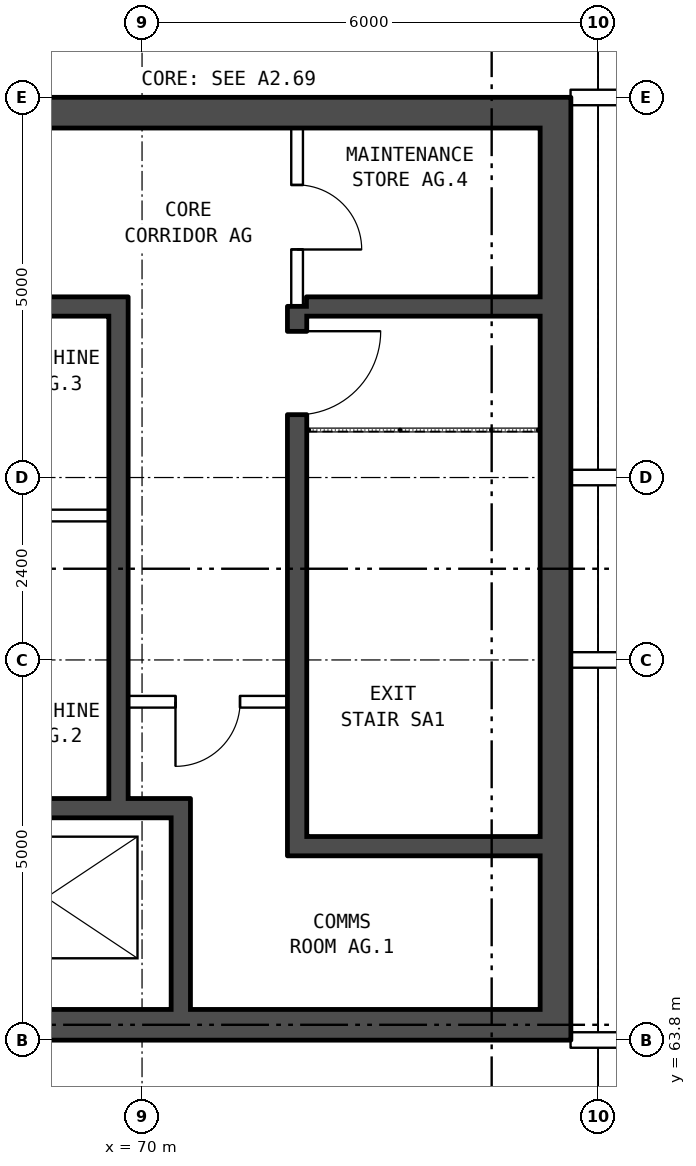
"""IFC4 building model, lengths in metres.
Left out: names, types, materials, properties, quantities, classifications, styles, units other than length and angle.
Written with IfcOpenShell. Run it as: python <this file> out.ifc"""

import sys

from ifc_helpers import new_model, si_unit, direction, frame, frame_2d, origin, place, context, subcontext, project, spatial, rectangle, extrude, element, fill, save


model = new_model("IFC4")
c1 = context("Model", 3, precision=1e-05, world=origin(), true_north=direction((0.0, 1.0)))
c2 = subcontext(c1, "Body", "Model", "MODEL_VIEW")
j1 = project(units=[si_unit("LENGTHUNIT", "METRE"), si_unit("PLANEANGLEUNIT", "RADIAN")], contexts=[c1])
p1 = place(None, origin())
s1 = spatial("IfcSite", under=j1, at=p1, CompositionType="ELEMENT")
p2 = place(p1, origin())
s2 = spatial("IfcBuilding", under=s1, at=p2, CompositionType="ELEMENT")
p3 = place(p2, frame((0.0, 0.0, 243.9)))
s3 = spatial("IfcBuildingStorey", under=s2, at=p3, CompositionType="ELEMENT", Elevation=243.9)
p4 = place(p3, frame((75.44, 63.8, 0.0), z_axis=(0.0, 0.0, 1.0), x_axis=(0.0, 1.0, 0.0)))
e1 = element("IfcWall", 1, at=p4, inside=s3, PredefinedType="SHEAR", context=c2, shape_type="SweptSolid", body=[
    extrude(rectangle(XDim=12.4, YDim=0.4, at=frame_2d((6.2, 0.0))), origin(), (0.0, 0.0, 1.0), 3.3),
])
for number, where, z_axis, x_axis in (
    (2, (67.04, 64.0, 0.0), (0.0, 0.0, 1.0), (1.0, 0.0, 0.0)),
    (3, (67.04, 76.0, 0.0), (0.0, 0.0, 1.0), (1.0, 0.0, 0.0)),
):
    element("IfcWall", number, at=place(p3, frame(where, z_axis=z_axis, x_axis=x_axis)), inside=s3, PredefinedType="SHEAR", context=c2, shape_type="SweptSolid", body=[
        extrude(rectangle(XDim=8.2, YDim=0.4, at=frame_2d((4.1, 0.0))), origin(), (0.0, 0.0, 1.0), 3.3),
    ])
p5 = place(p3, frame((72.165, 66.35, 0.0), z_axis=(0.0, 0.0, 1.0), x_axis=(1.0, 0.0, 0.0)))
e4 = element("IfcWall", 4, at=p5, inside=s3, PredefinedType="SHEAR", context=c2, shape_type="SweptSolid", body=[
    extrude(rectangle(XDim=3.075, YDim=0.25, at=frame_2d((1.538, 0.0))), origin(), (0.0, 0.0, 1.0), 3.3),
])
p6 = place(p3, frame((67.04, 66.85, 0.0), z_axis=(0.0, 0.0, 1.0), x_axis=(1.0, 0.0, 0.0)))
e5 = element("IfcWall", 5, at=p6, inside=s3, PredefinedType="SHEAR", context=c2, shape_type="SweptSolid", body=[
    extrude(rectangle(XDim=3.595, YDim=0.25, at=frame_2d((1.797, 0.0))), origin(), (0.0, 0.0, 1.0), 3.3),
])
p7 = place(p3, frame((69.815, 68.25, 0.0), z_axis=(0.0, 0.0, 1.0), x_axis=(1.0, 0.0, 0.0)))
e6 = element("IfcWall", 6, at=p7, inside=s3, PredefinedType="PARTITIONING", context=c2, shape_type="SweptSolid", body=[
    extrude(rectangle(XDim=2.1, YDim=0.15, at=frame_2d((1.05, 0.0))), origin(), (0.0, 0.0, 1.0), 3.3),
])
p8 = place(p7, frame((0.625, 0.0, 0.0)))
e7 = element("IfcOpeningElement", 7, at=p8, cuts=e6, PredefinedType="OPENING", context=c2, shape_type="SweptSolid", body=[
    extrude(rectangle(XDim=0.85, YDim=2.1, at=frame_2d((0.425, 1.05))), frame((0.0, 0.085, 0.0), z_axis=(0.0, -1.0, 0.0), x_axis=(1.0, 0.0, 0.0)), (0.0, 0.0, 1.0), 0.17),
])
p9 = place(p3, frame((67.04, 70.7, 0.0), z_axis=(0.0, 0.0, 1.0), x_axis=(1.0, 0.0, 0.0)))
e8 = element("IfcWall", 8, at=p9, inside=s3, PredefinedType="PARTITIONING", context=c2, shape_type="SweptSolid", body=[
    extrude(rectangle(XDim=2.525, YDim=0.15, at=frame_2d((1.262, 0.0))), origin(), (0.0, 0.0, 1.0), 3.3),
])
p10 = place(p3, frame((67.04, 73.45, 0.0), z_axis=(0.0, 0.0, 1.0), x_axis=(1.0, 0.0, 0.0)))
e9 = element("IfcWall", 9, at=p10, inside=s3, PredefinedType="SHEAR", context=c2, shape_type="SweptSolid", body=[
    extrude(rectangle(XDim=2.525, YDim=0.25, at=frame_2d((1.262, 0.0))), origin(), (0.0, 0.0, 1.0), 3.3),
])
p11 = place(p3, frame((72.165, 73.45, 0.0), z_axis=(0.0, 0.0, 1.0), x_axis=(1.0, 0.0, 0.0)))
e10 = element("IfcWall", 10, at=p11, inside=s3, PredefinedType="SHEAR", context=c2, shape_type="SweptSolid", body=[
    extrude(rectangle(XDim=3.075, YDim=0.25, at=frame_2d((1.538, 0.0))), origin(), (0.0, 0.0, 1.0), 3.3),
])
p12 = place(p3, frame((69.69, 66.975, 0.0), z_axis=(0.0, 0.0, 1.0), x_axis=(0.0, 1.0, 0.0)))
e11 = element("IfcWall", 11, at=p12, inside=s3, PredefinedType="SHEAR", context=c2, shape_type="SweptSolid", body=[
    extrude(rectangle(XDim=6.6, YDim=0.25, at=frame_2d((3.3, 0.0))), origin(), (0.0, 0.0, 1.0), 3.3),
])
p13 = place(p3, frame((70.51, 64.2, 0.0), z_axis=(0.0, 0.0, 1.0), x_axis=(0.0, 1.0, 0.0)))
e12 = element("IfcWall", 12, at=p13, inside=s3, PredefinedType="SHEAR", context=c2, shape_type="SweptSolid", body=[
    extrude(rectangle(XDim=2.525, YDim=0.25, at=frame_2d((1.263, 0.0))), origin(), (0.0, 0.0, 1.0), 3.3),
])
p14 = place(p3, frame((72.04, 66.225, 0.0), z_axis=(0.0, 0.0, 1.0), x_axis=(0.0, 1.0, 0.0)))
e13 = element("IfcWall", 13, at=p14, inside=s3, PredefinedType="SHEAR", context=c2, shape_type="SweptSolid", body=[
    extrude(rectangle(XDim=7.225, YDim=0.25, at=frame_2d((3.612, 0.0))), origin(), (0.0, 0.0, 1.0), 3.3),
])
p15 = place(p14, frame((5.8, 0.0, 0.0)))
e14 = element("IfcOpeningElement", 14, at=p15, cuts=e13, PredefinedType="OPENING", context=c2, shape_type="SweptSolid", body=[
    extrude(rectangle(XDim=1.1, YDim=2.1, at=frame_2d((0.55, 1.05))), frame((0.0, 0.135, 0.0), z_axis=(0.0, -1.0, 0.0), x_axis=(1.0, 0.0, 0.0)), (0.0, 0.0, 1.0), 0.27),
])
p16 = place(p3, frame((72.04, 73.45, 0.0), z_axis=(0.0, 0.0, 1.0), x_axis=(0.0, 1.0, 0.0)))
e15 = element("IfcWall", 15, at=p16, inside=s3, PredefinedType="PARTITIONING", context=c2, shape_type="SweptSolid", body=[
    extrude(rectangle(XDim=2.35, YDim=0.15, at=frame_2d((1.175, 0.0))), origin(), (0.0, 0.0, 1.0), 3.3),
])
p17 = place(p16, frame((0.75, 0.0, 0.0)))
e16 = element("IfcOpeningElement", 16, at=p17, cuts=e15, PredefinedType="OPENING", context=c2, shape_type="SweptSolid", body=[
    extrude(rectangle(XDim=0.85, YDim=2.1, at=frame_2d((0.425, 1.05))), frame((0.0, 0.085, 0.0), z_axis=(0.0, -1.0, 0.0), x_axis=(1.0, 0.0, 0.0)), (0.0, 0.0, 1.0), 0.17),
])
p18 = place(p3, frame((75.64, 63.8, 0.0), z_axis=(0.0, 0.0, 1.0), x_axis=(1.0, 0.0, 0.0)))
e17 = element("IfcWall", 17, at=p18, inside=s3, PredefinedType="PARTITIONING", context=c2, shape_type="SweptSolid", body=[
    extrude(rectangle(XDim=26.66, YDim=0.2, at=frame_2d((13.33, 0.0))), origin(), (0.0, 0.0, 1.0), 3.3),
])
p19 = place(p18, frame((12.58, 0.0, 0.0)))
e18 = element("IfcOpeningElement", 18, at=p19, cuts=e17, PredefinedType="OPENING", context=c2, shape_type="SweptSolid", body=[
    extrude(rectangle(XDim=1.0, YDim=2.1, at=frame_2d((0.5, 1.05))), frame((0.0, 0.11, 0.0), z_axis=(0.0, -1.0, 0.0), x_axis=(1.0, 0.0, 0.0)), (0.0, 0.0, 1.0), 0.22),
])
p20 = place(p3, frame((75.64, 68.8, 0.0), z_axis=(0.0, 0.0, 1.0), x_axis=(1.0, 0.0, 0.0)))
e19 = element("IfcWall", 19, at=p20, inside=s3, PredefinedType="PARTITIONING", context=c2, shape_type="SweptSolid", body=[
    extrude(rectangle(XDim=26.66, YDim=0.2, at=frame_2d((13.33, 0.0))), origin(), (0.0, 0.0, 1.0), 3.3),
])
p21 = place(p3, frame((75.64, 71.2, 0.0), z_axis=(0.0, 0.0, 1.0), x_axis=(1.0, 0.0, 0.0)))
e20 = element("IfcWall", 20, at=p21, inside=s3, PredefinedType="PARTITIONING", context=c2, shape_type="SweptSolid", body=[
    extrude(rectangle(XDim=55.72, YDim=0.2, at=frame_2d((27.86, 0.0))), origin(), (0.0, 0.0, 1.0), 3.3),
])
p22 = place(p21, frame((6.555, 0.0, 0.0)))
e21 = element("IfcOpeningElement", 21, at=p22, cuts=e20, PredefinedType="OPENING", context=c2, shape_type="SweptSolid", body=[
    extrude(rectangle(XDim=1.0, YDim=2.1, at=frame_2d((0.5, 1.05))), frame((0.0, 0.11, 0.0), z_axis=(0.0, -1.0, 0.0), x_axis=(1.0, 0.0, 0.0)), (0.0, 0.0, 1.0), 0.22),
])
p23 = place(p21, frame((27.36, 0.0, 0.0)))
e22 = element("IfcOpeningElement", 22, at=p23, cuts=e20, PredefinedType="OPENING", context=c2, shape_type="SweptSolid", body=[
    extrude(rectangle(XDim=1.0, YDim=2.1, at=frame_2d((0.5, 1.05))), frame((0.0, 0.11, 0.0), z_axis=(0.0, -1.0, 0.0), x_axis=(1.0, 0.0, 0.0)), (0.0, 0.0, 1.0), 0.22),
])
p24 = place(p21, frame((48.165, 0.0, 0.0)))
e23 = element("IfcOpeningElement", 23, at=p24, cuts=e20, PredefinedType="OPENING", context=c2, shape_type="SweptSolid", body=[
    extrude(rectangle(XDim=1.0, YDim=2.1, at=frame_2d((0.5, 1.05))), frame((0.0, 0.11, 0.0), z_axis=(0.0, -1.0, 0.0), x_axis=(1.0, 0.0, 0.0)), (0.0, 0.0, 1.0), 0.22),
])
p25 = place(p3, frame((75.64, 76.2, 0.0), z_axis=(0.0, 0.0, 1.0), x_axis=(1.0, 0.0, 0.0)))
e24 = element("IfcWall", 24, at=p25, inside=s3, PredefinedType="PARTITIONING", context=c2, shape_type="SweptSolid", body=[
    extrude(rectangle(XDim=55.72, YDim=0.2, at=frame_2d((27.86, 0.0))), origin(), (0.0, 0.0, 1.0), 3.3),
])
p26 = place(p15, frame((1.1, 0.0, 0.0), z_axis=(0.0, 0.0, 1.0), x_axis=(-1.0, 0.0, 0.0)))
e25 = element("IfcDoor", 25, at=p26, inside=s3, OperationType="SINGLE_SWING_LEFT", PredefinedType="DOOR", context=c2, shape_type="SweptSolid", body=[
    extrude(rectangle(XDim=1.1, YDim=2.1, at=frame_2d((0.55, 1.05))), frame((0.0, 0.025, 0.0), z_axis=(0.0, -1.0, 0.0), x_axis=(1.0, 0.0, 0.0)), (0.0, 0.0, 1.0), 0.05),
])
fill(e14, e25)
p27 = place(p8, frame((0.85, 0.0, 0.0), z_axis=(0.0, 0.0, 1.0), x_axis=(-1.0, 0.0, 0.0)))
e26 = element("IfcDoor", 26, at=p27, inside=s3, OperationType="SINGLE_SWING_RIGHT", PredefinedType="DOOR", context=c2, shape_type="SweptSolid", body=[
    extrude(rectangle(XDim=0.85, YDim=2.1, at=frame_2d((0.425, 1.05))), frame((0.0, 0.025, 0.0), z_axis=(0.0, -1.0, 0.0), x_axis=(1.0, 0.0, 0.0)), (0.0, 0.0, 1.0), 0.05),
])
fill(e7, e26)
p28 = place(p17, frame((0.85, 0.0, 0.0), z_axis=(0.0, 0.0, 1.0), x_axis=(-1.0, 0.0, 0.0)))
e27 = element("IfcDoor", 27, at=p28, inside=s3, OperationType="SINGLE_SWING_RIGHT", PredefinedType="DOOR", context=c2, shape_type="SweptSolid", body=[
    extrude(rectangle(XDim=0.85, YDim=2.1, at=frame_2d((0.425, 1.05))), frame((0.0, 0.025, 0.0), z_axis=(0.0, -1.0, 0.0), x_axis=(1.0, 0.0, 0.0)), (0.0, 0.0, 1.0), 0.05),
])
fill(e16, e27)
save(model, sys.argv[1])
